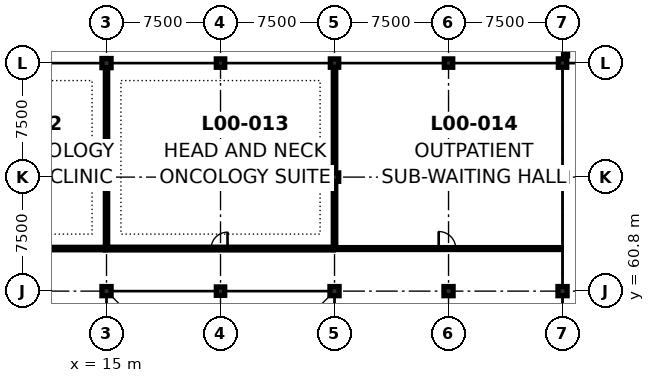
"""IFC4 building model, lengths in metres.
Left out: names, types, materials, properties, quantities, classifications, styles, units other than length and angle.
Written with IfcOpenShell. Run it as: python <this file> out.ifc"""

import sys

from ifc_helpers import new_model, si_unit, direction, frame, frame_2d, origin, origin_2d, place, context, subcontext, project, spatial, rectangle, extrude, element, fill, save


model = new_model("IFC4")
c1 = context("Model", 3, precision=1e-05, world=origin(), true_north=direction((0.0, 1.0)))
c2 = subcontext(c1, "Body", "Model", "MODEL_VIEW")
j1 = project(units=[si_unit("LENGTHUNIT", "METRE"), si_unit("PLANEANGLEUNIT", "RADIAN")], contexts=[c1])
p1 = place(None, origin())
s1 = spatial("IfcSite", under=j1, at=p1, CompositionType="ELEMENT")
p2 = place(p1, origin())
s2 = spatial("IfcBuilding", under=s1, at=p2, CompositionType="ELEMENT")
p3 = place(p2, origin())
s3 = spatial("IfcBuildingStorey", under=s2, at=p3, CompositionType="ELEMENT", Elevation=0.0)
for number, where, z_axis, x_axis in (
    (1, (15.0, 60.8, 0.0), (0.0, 0.0, 1.0), (1.0, 0.0, 0.0)),
    (2, (15.0, 68.3, 0.0), (0.0, 0.0, 1.0), (1.0, 0.0, 0.0)),
    (3, (15.0, 75.8, 0.0), (0.0, 0.0, 1.0), (1.0, 0.0, 0.0)),
):
    element("IfcColumn", number, at=place(p3, frame(where, z_axis=z_axis, x_axis=x_axis)), inside=s3, PredefinedType="COLUMN", context=c2, shape_type="SweptSolid", body=[
        extrude(rectangle(XDim=0.6, YDim=0.6, at=origin_2d()), origin(), (0.0, 0.0, 1.0), 4.7),
    ])
for number, where, z_axis, x_axis in (
    (4, (22.5, 60.8, 0.0), (0.0, 0.0, 1.0), (1.0, 0.0, 0.0)),
    (5, (22.5, 68.3, 0.0), (0.0, 0.0, 1.0), (1.0, 0.0, 0.0)),
    (6, (22.5, 75.8, 0.0), (0.0, 0.0, 1.0), (1.0, 0.0, 0.0)),
):
    element("IfcColumn", number, at=place(p3, frame(where, z_axis=z_axis, x_axis=x_axis)), inside=s3, PredefinedType="COLUMN", context=c2, shape_type="SweptSolid", body=[
        extrude(rectangle(XDim=0.55, YDim=0.55, at=origin_2d()), origin(), (0.0, 0.0, 1.0), 4.7),
    ])
p4 = place(p3, frame((30.0, 60.8, 0.0), z_axis=(0.0, 0.0, 1.0), x_axis=(1.0, 0.0, 0.0)))
e7 = element("IfcColumn", 7, at=p4, inside=s3, PredefinedType="COLUMN", context=c2, shape_type="SweptSolid", body=[
    extrude(rectangle(XDim=0.6, YDim=0.6, at=origin_2d()), origin(), (0.0, 0.0, 1.0), 4.7),
])
for number, where, z_axis, x_axis in (
    (8, (30.0, 68.3, 0.0), (0.0, 0.0, 1.0), (1.0, 0.0, 0.0)),
    (9, (30.0, 75.8, 0.0), (0.0, 0.0, 1.0), (1.0, 0.0, 0.0)),
):
    element("IfcColumn", number, at=place(p3, frame(where, z_axis=z_axis, x_axis=x_axis)), inside=s3, PredefinedType="COLUMN", context=c2, shape_type="SweptSolid", body=[
        extrude(rectangle(XDim=0.55, YDim=0.55, at=origin_2d()), origin(), (0.0, 0.0, 1.0), 4.7),
    ])
p5 = place(p3, frame((37.5, 60.8, 0.0), z_axis=(0.0, 0.0, 1.0), x_axis=(1.0, 0.0, 0.0)))
e10 = element("IfcColumn", 10, at=p5, inside=s3, PredefinedType="COLUMN", context=c2, shape_type="SweptSolid", body=[
    extrude(rectangle(XDim=0.6, YDim=0.6, at=origin_2d()), origin(), (0.0, 0.0, 1.0), 4.7),
])
for number, where, z_axis, x_axis in (
    (11, (37.5, 68.3, 0.0), (0.0, 0.0, 1.0), (1.0, 0.0, 0.0)),
    (12, (37.5, 75.8, 0.0), (0.0, 0.0, 1.0), (1.0, 0.0, 0.0)),
):
    element("IfcColumn", number, at=place(p3, frame(where, z_axis=z_axis, x_axis=x_axis)), inside=s3, PredefinedType="COLUMN", context=c2, shape_type="SweptSolid", body=[
        extrude(rectangle(XDim=0.55, YDim=0.55, at=origin_2d()), origin(), (0.0, 0.0, 1.0), 4.75),
    ])
p6 = place(p3, frame((45.0, 60.8, 0.0), z_axis=(0.0, 0.0, 1.0), x_axis=(1.0, 0.0, 0.0)))
e13 = element("IfcColumn", 13, at=p6, inside=s3, PredefinedType="COLUMN", context=c2, shape_type="SweptSolid", body=[
    extrude(rectangle(XDim=0.6, YDim=0.6, at=origin_2d()), origin(), (0.0, 0.0, 1.0), 4.7),
])
for number, where, z_axis, x_axis in (
    (14, (45.0, 68.3, 0.0), (0.0, 0.0, 1.0), (1.0, 0.0, 0.0)),
    (15, (45.0, 75.8, 0.0), (0.0, 0.0, 1.0), (1.0, 0.0, 0.0)),
):
    element("IfcColumn", number, at=place(p3, frame(where, z_axis=z_axis, x_axis=x_axis)), inside=s3, PredefinedType="COLUMN", context=c2, shape_type="SweptSolid", body=[
        extrude(rectangle(XDim=0.55, YDim=0.55, at=origin_2d()), origin(), (0.0, 0.0, 1.0), 4.75),
    ])
p7 = place(p3, frame((45.2, 76.28, 4.9), z_axis=(0.0, 0.0, 1.0), x_axis=(0.0, 1.0, 0.0)))
e16 = element("IfcWall", 16, at=p7, inside=s3, PredefinedType="PARAPET", context=c2, shape_type="SweptSolid", body=[
    extrude(rectangle(XDim=6.52, YDim=0.26, at=frame_2d((3.26, 0.0))), origin(), (0.0, 0.0, 1.0), 0.6),
])
p8 = place(p3, frame((0.102, 63.6, 0.0), z_axis=(0.0, 0.0, 1.0), x_axis=(1.0, 0.0, 0.0)))
e17 = element("IfcWall", 17, at=p8, inside=s3, PredefinedType="PARTITIONING", context=c2, shape_type="SweptSolid", body=[
    extrude(rectangle(XDim=14.813, YDim=0.16, at=frame_2d((7.406, 0.0))), origin(), (0.0, 0.0, 1.0), 3.765),
])
p9 = place(p8, frame((6.917, 0.0, 0.0)))
e18 = element("IfcOpeningElement", 18, at=p9, cuts=e17, PredefinedType="OPENING", context=c2, shape_type="SweptSolid", body=[
    extrude(rectangle(XDim=0.98, YDim=2.12, at=frame_2d((0.49, 1.06))), frame((0.0, 0.092, 0.0), z_axis=(0.0, -1.0, 0.0), x_axis=(1.0, 0.0, 0.0)), (0.0, 0.0, 1.0), 0.184),
])
p10 = place(p3, frame((14.927, 63.6, 0.0), z_axis=(0.0, 0.0, 1.0), x_axis=(1.0, 0.0, 0.0)))
e19 = element("IfcWall", 19, at=p10, inside=s3, PredefinedType="PARTITIONING", context=c2, shape_type="SweptSolid", body=[
    extrude(rectangle(XDim=14.988, YDim=0.18, at=frame_2d((7.494, 0.0))), origin(), (0.0, 0.0, 1.0), 3.765),
])
p11 = place(p10, frame((6.954, 0.0, 0.0)))
e20 = element("IfcOpeningElement", 20, at=p11, cuts=e19, PredefinedType="OPENING", context=c2, shape_type="SweptSolid", body=[
    extrude(rectangle(XDim=1.08, YDim=2.18, at=frame_2d((0.54, 1.09))), frame((0.0, 0.102, 0.0), z_axis=(0.0, -1.0, 0.0), x_axis=(1.0, 0.0, 0.0)), (0.0, 0.0, 1.0), 0.204),
])
p12 = place(p3, frame((29.927, 63.6, 0.0), z_axis=(0.0, 0.0, 1.0), x_axis=(1.0, 0.0, 0.0)))
e21 = element("IfcWall", 21, at=p12, inside=s3, PredefinedType="PARTITIONING", context=c2, shape_type="SweptSolid", body=[
    extrude(rectangle(XDim=14.971, YDim=0.125, at=frame_2d((7.485, 0.0))), origin(), (0.0, 0.0, 1.0), 3.985),
])
p13 = place(p12, frame((6.926, 0.0, 0.0)))
e22 = element("IfcOpeningElement", 22, at=p13, cuts=e21, PredefinedType="OPENING", context=c2, shape_type="SweptSolid", body=[
    extrude(rectangle(XDim=1.12, YDim=2.2, at=frame_2d((0.56, 1.1))), frame((0.0, 0.074, 0.0), z_axis=(0.0, -1.0, 0.0), x_axis=(1.0, 0.0, 0.0)), (0.0, 0.0, 1.0), 0.149),
])
p14 = place(p3, frame((15.0, 63.702, 0.0), z_axis=(0.0, 0.0, 1.0), x_axis=(0.0, 1.0, 0.0)))
e23 = element("IfcWall", 23, at=p14, inside=s3, PredefinedType="PARTITIONING", context=c2, shape_type="SweptSolid", body=[
    extrude(rectangle(XDim=11.786, YDim=0.15, at=frame_2d((5.893, 0.0))), origin(), (0.0, 0.0, 1.0), 3.765),
])
p15 = place(p3, frame((30.0, 63.675, 0.0), z_axis=(0.0, 0.0, 1.0), x_axis=(0.0, 1.0, 0.0)))
e24 = element("IfcWall", 24, at=p15, inside=s3, PredefinedType="PARTITIONING", context=c2, shape_type="SweptSolid", body=[
    extrude(rectangle(XDim=11.838, YDim=0.16, at=frame_2d((5.919, 0.0))), origin(), (0.0, 0.0, 1.0), 3.765),
])
p16 = place(p11, origin())
e25 = element("IfcDoor", 25, at=p16, inside=s3, OperationType="SINGLE_SWING_RIGHT", PredefinedType="DOOR", context=c2, shape_type="SweptSolid", body=[
    extrude(rectangle(XDim=1.08, YDim=2.18, at=frame_2d((0.54, 1.09))), frame((0.0, 0.025, 0.0), z_axis=(0.0, -1.0, 0.0), x_axis=(1.0, 0.0, 0.0)), (0.0, 0.0, 1.0), 0.05),
])
fill(e20, e25)
p17 = place(p13, origin())
e26 = element("IfcDoor", 26, at=p17, inside=s3, OperationType="SINGLE_SWING_LEFT", PredefinedType="DOOR", context=c2, shape_type="SweptSolid", body=[
    extrude(rectangle(XDim=1.12, YDim=2.2, at=frame_2d((0.56, 1.1))), frame((0.0, 0.025, 0.0), z_axis=(0.0, -1.0, 0.0), x_axis=(1.0, 0.0, 0.0)), (0.0, 0.0, 1.0), 0.05),
])
fill(e22, e26)
save(model, sys.argv[1])
